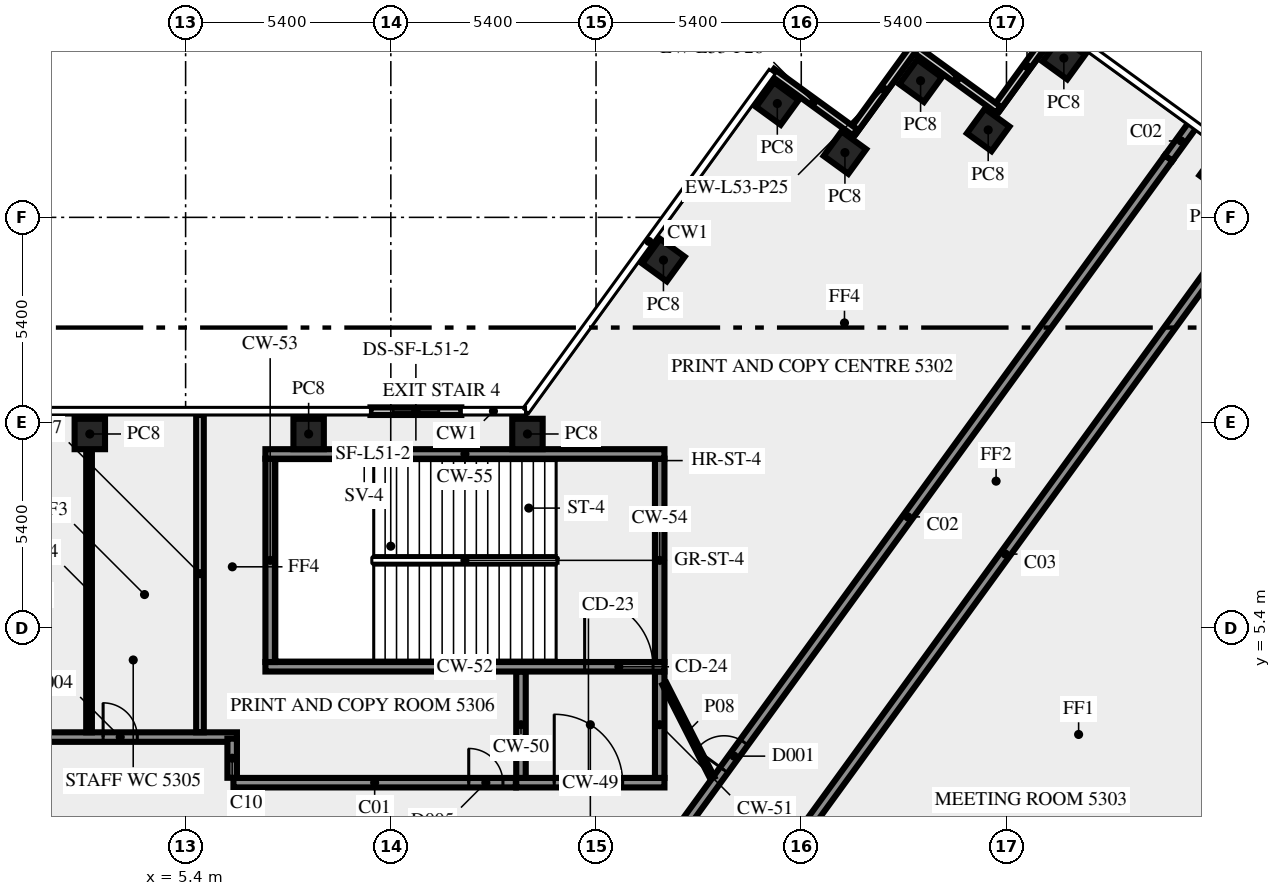
"""IFC4 building model, lengths in metres.
Left out: names, types, materials, properties, quantities, classifications, styles, units other than length and angle.
Written with IfcOpenShell. Run it as: python <this file> out.ifc"""

import sys

from ifc_helpers import new_model, si_unit, direction, frame, frame_2d, origin, origin_2d, place, context, subcontext, project, spatial, rectangle, extrude, element, fill, save


model = new_model("IFC4")
c1 = context("Model", 3, precision=1e-05, world=origin(), true_north=direction((0.0, 1.0)))
c2 = subcontext(c1, "Body", "Model", "MODEL_VIEW")
j1 = project(units=[si_unit("LENGTHUNIT", "METRE"), si_unit("PLANEANGLEUNIT", "RADIAN")], contexts=[c1])
p1 = place(None, origin())
s1 = spatial("IfcSite", under=j1, at=p1, CompositionType="ELEMENT")
p2 = place(p1, origin())
s2 = spatial("IfcBuilding", under=s1, at=p2, CompositionType="ELEMENT")
p3 = place(p2, frame((0.0, 0.0, 226.0)))
s3 = spatial("IfcBuildingStorey", under=s2, at=p3, CompositionType="ELEMENT", Elevation=226.0)
for number, where, z_axis, x_axis in (
    (1, (32.637, 17.393, 0.0), (0.0, 0.0, 1.0), (-0.809, 0.588, 0.0)),
    (2, (28.51, 20.39, 0.0), (0.0, 0.0, 1.0), (-0.588, -0.809, 0.0)),
    (3, (26.519, 18.5, 0.0), (0.0, 0.0, 1.0), (-0.809, 0.588, 0.0)),
    (4, (24.74, 19.795, 0.0), (0.0, 0.0, 1.0), (-0.588, -0.809, 0.0)),
    (5, (22.749, 17.904, 0.0), (0.0, 0.0, 1.0), (-0.588, -0.809, 0.0)),
    (6, (20.97, 19.195, 0.0), (0.0, 0.0, 1.0), (-0.588, -0.809, 0.0)),
    (7, (17.974, 15.075, 0.0), (0.0, 0.0, 1.0), (-0.588, -0.809, 0.0)),
    (8, (14.395, 10.5, 0.0), (0.0, 0.0, 1.0), (-1.0, 0.0, 0.0)),
    (9, (8.637, 10.5, 0.0), (0.0, 0.0, 1.0), (-1.0, 0.0, 0.0)),
    (10, (2.879, 10.5, 0.0), (0.0, 0.0, 1.0), (-1.0, 0.0, 0.0)),
):
    element("IfcColumn", number, at=place(p3, frame(where, z_axis=z_axis, x_axis=x_axis)), inside=s3, PredefinedType="COLUMN", context=c2, shape_type="SweptSolid", body=[
        extrude(rectangle(XDim=0.8, YDim=0.8, at=origin_2d()), origin(), (0.0, 0.0, 1.0), 3.65),
    ])
p4 = place(p3, frame((28.334, 21.262, 0.0), z_axis=(0.0, 0.0, 1.0), x_axis=(-0.587762999008, -0.809033161865, 0.0)))
e11 = element("IfcWall", 11, at=p4, inside=s3, PredefinedType="SOLIDWALL", context=c2, shape_type="SweptSolid", body=[
    extrude(rectangle(XDim=2.7, YDim=0.2, at=frame_2d((1.35, 0.0))), origin(), (0.0, 0.0, 1.0), 3.65),
])
p5 = place(p3, frame((26.785, 19.036, 0.0), z_axis=(0.0, 0.0, 1.0), x_axis=(-0.809064397168, 0.587720002413, 0.0)))
e12 = element("IfcWall", 12, at=p5, inside=s3, PredefinedType="SOLIDWALL", context=c2, shape_type="SweptSolid", body=[
    extrude(rectangle(XDim=2.7, YDim=0.2, at=frame_2d((1.35, 0.0))), origin(), (0.0, 0.0, 1.0), 3.65),
])
for number, where, z_axis, x_axis in (
    (13, (24.563, 20.665, 0.0), (0.0, 0.0, 1.0), (-0.588, -0.809, 0.0)),
    (14, (23.013, 18.438, 0.0), (0.0, 0.0, 1.0), (-0.809, 0.588, 0.0)),
):
    element("IfcWall", number, at=place(p3, frame(where, z_axis=z_axis, x_axis=x_axis)), inside=s3, PredefinedType="SOLIDWALL", context=c2, shape_type="SweptSolid", body=[
        extrude(rectangle(XDim=2.7, YDim=0.2, at=frame_2d((1.35, 0.0))), origin(), (0.0, 0.0, 1.0), 3.65),
    ])
p6 = place(p3, frame((12.655, 11.1, 0.0), z_axis=(0.0, 0.0, 1.0), x_axis=(-1.0, 0.0, 0.0)))
e15 = element("IfcWall", 15, at=p6, inside=s3, PredefinedType="SOLIDWALL", context=c2, shape_type="SweptSolid", body=[
    extrude(rectangle(XDim=2.392, YDim=0.2, at=frame_2d((1.196, 0.0))), origin(), (0.0, 0.0, 1.0), 3.65),
])
p7 = place(p6, frame((0.596, 0.0, 1.0)))
e16 = element("IfcOpeningElement", 16, at=p7, cuts=e15, PredefinedType="OPENING", context=c2, shape_type="SweptSolid", body=[
    extrude(rectangle(XDim=1.2, YDim=1.2, at=frame_2d((0.6, 0.6))), frame((0.0, 0.11, 0.0), z_axis=(0.0, -1.0, 0.0), x_axis=(1.0, 0.0, 0.0)), (0.0, 0.0, 1.0), 0.22),
])
p8 = place(p3, frame((14.1, 1.325, 0.0), z_axis=(0.0, 0.0, 1.0), x_axis=(1.0, 0.0, 0.0)))
e17 = element("IfcWall", 17, at=p8, inside=s3, PredefinedType="SHEAR", context=c2, shape_type="SweptSolid", body=[
    extrude(rectangle(XDim=3.9, YDim=0.25, at=frame_2d((1.95, 0.0))), origin(), (0.0, 0.0, 1.0), 3.65),
])
p9 = place(p8, frame((1.0, 0.0, 0.0)))
e18 = element("IfcOpeningElement", 18, at=p9, cuts=e17, PredefinedType="OPENING", context=c2, shape_type="SweptSolid", body=[
    extrude(rectangle(XDim=1.8, YDim=2.1, at=frame_2d((0.9, 1.05))), frame((0.0, 0.135, 0.0), z_axis=(0.0, -1.0, 0.0), x_axis=(1.0, 0.0, 0.0)), (0.0, 0.0, 1.0), 0.27),
])
for number, where, z_axis, x_axis in (
    (19, (14.225, 1.45, 0.0), (0.0, 0.0, 1.0), (0.0, 1.0, 0.0)),
    (20, (17.875, 1.45, 0.0), (0.0, 0.0, 1.0), (0.0, 1.0, 0.0)),
):
    element("IfcWall", number, at=place(p3, frame(where, z_axis=z_axis, x_axis=x_axis)), inside=s3, PredefinedType="SHEAR", context=c2, shape_type="SweptSolid", body=[
        extrude(rectangle(XDim=2.8, YDim=0.25, at=frame_2d((1.4, 0.0))), origin(), (0.0, 0.0, 1.0), 3.65),
    ])
p10 = place(p3, frame((7.5, 4.375, 0.0), z_axis=(0.0, 0.0, 1.0), x_axis=(1.0, 0.0, 0.0)))
e21 = element("IfcWall", 21, at=p10, inside=s3, PredefinedType="SHEAR", context=c2, shape_type="SweptSolid", body=[
    extrude(rectangle(XDim=10.5, YDim=0.25, at=frame_2d((5.25, 0.0))), origin(), (0.0, 0.0, 1.0), 3.65),
])
p11 = place(p10, frame((8.4, 0.0, 0.0)))
e22 = element("IfcOpeningElement", 22, at=p11, cuts=e21, PredefinedType="OPENING", context=c2, shape_type="SweptSolid", body=[
    extrude(rectangle(XDim=1.8, YDim=2.1, at=frame_2d((0.9, 1.05))), frame((0.0, 0.135, 0.0), z_axis=(0.0, -1.0, 0.0), x_axis=(1.0, 0.0, 0.0)), (0.0, 0.0, 1.0), 0.27),
])
for number, where, z_axis, x_axis in (
    (23, (7.625, 4.5, 0.0), (0.0, 0.0, 1.0), (0.0, 1.0, 0.0)),
    (24, (17.875, 4.5, 0.0), (0.0, 0.0, 1.0), (0.0, 1.0, 0.0)),
):
    element("IfcWall", number, at=place(p3, frame(where, z_axis=z_axis, x_axis=x_axis)), inside=s3, PredefinedType="SHEAR", context=c2, shape_type="SweptSolid", body=[
        extrude(rectangle(XDim=5.35, YDim=0.25, at=frame_2d((2.675, 0.0))), origin(), (0.0, 0.0, 1.0), 3.65),
    ])
p12 = place(p3, frame((7.5, 9.975, 0.0), z_axis=(0.0, 0.0, 1.0), x_axis=(1.0, 0.0, 0.0)))
e25 = element("IfcWall", 25, at=p12, inside=s3, PredefinedType="SHEAR", context=c2, shape_type="SweptSolid", body=[
    extrude(rectangle(XDim=10.5, YDim=0.25, at=frame_2d((5.25, 0.0))), origin(), (0.0, 0.0, 1.0), 3.65),
])
p13 = place(p12, frame((2.0, 0.0, 1.0)))
e26 = element("IfcOpeningElement", 26, at=p13, cuts=e25, PredefinedType="OPENING", context=c2, shape_type="SweptSolid", body=[
    extrude(rectangle(XDim=1.2, YDim=1.2, at=frame_2d((0.6, 0.6))), frame((0.0, 0.135, 0.0), z_axis=(0.0, -1.0, 0.0), x_axis=(1.0, 0.0, 0.0)), (0.0, 0.0, 1.0), 0.27),
])
p14 = place(p3, frame((6.659, 1.325, 0.0), z_axis=(0.0, 0.0, 1.0), x_axis=(1.0, 0.0, 0.0)))
e27 = element("IfcWall", 27, at=p14, inside=s3, PredefinedType="SOLIDWALL", context=c2, shape_type="SweptSolid", body=[
    extrude(rectangle(XDim=7.431, YDim=0.25, at=frame_2d((3.716, 0.0))), origin(), (0.0, 0.0, 1.0), 3.65),
])
p15 = place(p14, frame((6.191, 0.0, 0.0)))
e28 = element("IfcOpeningElement", 28, at=p15, cuts=e27, PredefinedType="OPENING", context=c2, shape_type="SweptSolid", body=[
    extrude(rectangle(XDim=0.9, YDim=2.1, at=frame_2d((0.45, 1.05))), frame((0.0, 0.135, 0.0), z_axis=(0.0, -1.0, 0.0), x_axis=(1.0, 0.0, 0.0)), (0.0, 0.0, 1.0), 0.27),
])
p16 = place(p3, frame((17.545, -1.125, 0.0), z_axis=(0.0, 0.0, 1.0), x_axis=(0.587787966774, 0.809015022181, 0.0)))
e29 = element("IfcWall", 29, at=p16, inside=s3, PredefinedType="SOLIDWALL", context=c2, shape_type="SweptSolid", body=[
    extrude(rectangle(XDim=23.345, YDim=0.25, at=frame_2d((11.672, 0.0))), origin(), (0.0, 0.0, 1.0), 3.65),
])
p17 = place(p16, frame((3.441, 0.0, 0.0)))
e30 = element("IfcOpeningElement", 30, at=p17, cuts=e29, PredefinedType="OPENING", context=c2, shape_type="SweptSolid", body=[
    extrude(rectangle(XDim=0.9, YDim=2.1, at=frame_2d((0.45, 1.05))), frame((0.0, 0.135, 0.0), z_axis=(0.0, -1.0, 0.0), x_axis=(1.0, 0.0, 0.0)), (0.0, 0.0, 1.0), 0.27),
])
p18 = place(p3, frame((33.41, 16.203, 0.0), z_axis=(0.0, 0.0, 1.0), x_axis=(-0.587786711753, -0.809015934013, 0.0)))
e31 = element("IfcWall", 31, at=p18, inside=s3, PredefinedType="SOLIDWALL", context=c2, shape_type="SweptSolid", body=[
    extrude(rectangle(XDim=21.911, YDim=0.25, at=frame_2d((10.956, 0.0))), origin(), (0.0, 0.0, 1.0), 3.65),
])
p19 = place(p18, frame((20.479, 0.0, 0.0)))
e32 = element("IfcOpeningElement", 32, at=p19, cuts=e31, PredefinedType="OPENING", context=c2, shape_type="SweptSolid", body=[
    extrude(rectangle(XDim=0.9, YDim=2.1, at=frame_2d((0.45, 1.05))), frame((0.0, 0.135, 0.0), z_axis=(0.0, -1.0, 0.0), x_axis=(1.0, 0.0, 0.0)), (0.0, 0.0, 1.0), 0.27),
])
p20 = place(p3, frame((-4.5, 2.525, 0.0), z_axis=(0.0, 0.0, 1.0), x_axis=(1.0, 0.0, 0.0)))
e33 = element("IfcWall", 33, at=p20, inside=s3, PredefinedType="SOLIDWALL", context=c2, shape_type="SweptSolid", body=[
    extrude(rectangle(XDim=11.25, YDim=0.25, at=frame_2d((5.625, 0.0))), origin(), (0.0, 0.0, 1.0), 3.65),
])
p21 = place(p20, frame((7.729, 0.0, 0.0)))
e34 = element("IfcOpeningElement", 34, at=p21, cuts=e33, PredefinedType="OPENING", context=c2, shape_type="SweptSolid", body=[
    extrude(rectangle(XDim=0.9, YDim=2.1, at=frame_2d((0.45, 1.05))), frame((0.0, 0.135, 0.0), z_axis=(0.0, -1.0, 0.0), x_axis=(1.0, 0.0, 0.0)), (0.0, 0.0, 1.0), 0.27),
])
p22 = place(p3, frame((6.625, 2.484, 0.0), z_axis=(0.0, 0.0, 1.0), x_axis=(0.0, -1.0, 0.0)))
e35 = element("IfcWall", 35, at=p22, inside=s3, PredefinedType="SOLIDWALL", context=c2, shape_type="SweptSolid", body=[
    extrude(rectangle(XDim=1.03, YDim=0.25, at=frame_2d((0.515, 0.0))), origin(), (0.0, 0.0, 1.0), 3.65),
])
p23 = place(p3, frame((2.859, 2.65, 0.0), z_axis=(0.0, 0.0, 1.0), x_axis=(0.0, 1.0, 0.0)))
e36 = element("IfcWall", 36, at=p23, inside=s3, PredefinedType="PARTITIONING", context=c2, shape_type="SweptSolid", body=[
    extrude(rectangle(XDim=7.445, YDim=0.15, at=frame_2d((3.723, 0.0))), origin(), (0.0, 0.0, 1.0), 3.65),
])
p24 = place(p3, frame((5.778, 11.0, 0.0), z_axis=(0.0, 0.0, 1.0), x_axis=(0.0, -1.0, 0.0)))
e37 = element("IfcWall", 37, at=p24, inside=s3, PredefinedType="SOLIDWALL", context=c2, shape_type="SweptSolid", body=[
    extrude(rectangle(XDim=8.35, YDim=0.2, at=frame_2d((4.175, 0.0))), origin(), (0.0, 0.0, 1.0), 2.85),
])
p25 = place(p3, frame((18.0, 3.925, 0.0), z_axis=(0.0, 0.0, 1.0), x_axis=(0.453950796792, -0.891026752736, 0.0)))
e38 = element("IfcWall", 38, at=p25, inside=s3, PredefinedType="PARTITIONING", context=c2, shape_type="SweptSolid", body=[
    extrude(rectangle(XDim=2.778, YDim=0.12, at=frame_2d((1.389, 0.0))), origin(), (0.0, 0.0, 1.0), 3.65),
])
p26 = place(p3, frame((31.267, 17.762, 0.0), z_axis=(0.0, 0.0, 1.0), x_axis=(0.587778942742, 0.809021578494, 0.0)))
e39 = element("IfcWall", 39, at=p26, inside=s3, PredefinedType="SOLIDWALL", context=c2, shape_type="SweptSolid", body=[
    extrude(rectangle(XDim=1.109, YDim=0.25, at=frame_2d((0.555, 0.0))), origin(), (0.0, 0.0, 1.0), 2.85),
])
p27 = place(p7, origin())
e40 = element("IfcWindow", 40, at=p27, inside=s3, PartitioningType="SINGLE_PANEL", PredefinedType="WINDOW", context=c2, shape_type="SweptSolid", body=[
    extrude(rectangle(XDim=1.2, YDim=1.2, at=frame_2d((0.6, 0.6))), frame((0.0, 0.03, 0.0), z_axis=(0.0, -1.0, 0.0), x_axis=(1.0, 0.0, 0.0)), (0.0, 0.0, 1.0), 0.06),
])
fill(e16, e40)
p28 = place(p9, origin())
e41 = element("IfcDoor", 41, at=p28, inside=s3, OperationType="DOUBLE_DOOR_SINGLE_SWING", PredefinedType="DOOR", context=c2, shape_type="SweptSolid", body=[
    extrude(rectangle(XDim=1.8, YDim=2.1, at=frame_2d((0.9, 1.05))), frame((0.0, 0.025, 0.0), z_axis=(0.0, -1.0, 0.0), x_axis=(1.0, 0.0, 0.0)), (0.0, 0.0, 1.0), 0.05),
])
fill(e18, e41)
p29 = place(p11, origin())
e42 = element("IfcDoor", 42, at=p29, inside=s3, OperationType="DOUBLE_DOOR_SINGLE_SWING", PredefinedType="DOOR", context=c2, shape_type="SweptSolid", body=[
    extrude(rectangle(XDim=1.8, YDim=2.1, at=frame_2d((0.9, 1.05))), frame((0.0, 0.025, 0.0), z_axis=(0.0, -1.0, 0.0), x_axis=(1.0, 0.0, 0.0)), (0.0, 0.0, 1.0), 0.05),
])
fill(e22, e42)
p30 = place(p13, origin())
e43 = element("IfcWindow", 43, at=p30, inside=s3, PartitioningType="SINGLE_PANEL", PredefinedType="WINDOW", context=c2, shape_type="SweptSolid", body=[
    extrude(rectangle(XDim=1.2, YDim=1.2, at=frame_2d((0.6, 0.6))), frame((0.0, 0.03, 0.0), z_axis=(0.0, -1.0, 0.0), x_axis=(1.0, 0.0, 0.0)), (0.0, 0.0, 1.0), 0.06),
])
fill(e26, e43)
p31 = place(p17, origin())
e44 = element("IfcDoor", 44, at=p31, inside=s3, OperationType="SINGLE_SWING_LEFT", PredefinedType="DOOR", context=c2, shape_type="SweptSolid", body=[
    extrude(rectangle(XDim=0.9, YDim=2.1, at=frame_2d((0.45, 1.05))), frame((0.0, 0.025, 0.0), z_axis=(0.0, -1.0, 0.0), x_axis=(1.0, 0.0, 0.0)), (0.0, 0.0, 1.0), 0.05),
])
fill(e30, e44)
p32 = place(p15, origin())
e45 = element("IfcDoor", 45, at=p32, inside=s3, OperationType="SINGLE_SWING_RIGHT", PredefinedType="DOOR", context=c2, shape_type="SweptSolid", body=[
    extrude(rectangle(XDim=0.9, YDim=2.1, at=frame_2d((0.45, 1.05))), frame((0.0, 0.025, 0.0), z_axis=(0.0, -1.0, 0.0), x_axis=(1.0, 0.0, 0.0)), (0.0, 0.0, 1.0), 0.05),
])
fill(e28, e45)
p33 = place(p21, origin())
e46 = element("IfcDoor", 46, at=p33, inside=s3, OperationType="SINGLE_SWING_LEFT", PredefinedType="DOOR", context=c2, shape_type="SweptSolid", body=[
    extrude(rectangle(XDim=0.9, YDim=2.1, at=frame_2d((0.45, 1.05))), frame((0.0, 0.025, 0.0), z_axis=(0.0, -1.0, 0.0), x_axis=(1.0, 0.0, 0.0)), (0.0, 0.0, 1.0), 0.05),
])
fill(e34, e46)
save(model, sys.argv[1])
